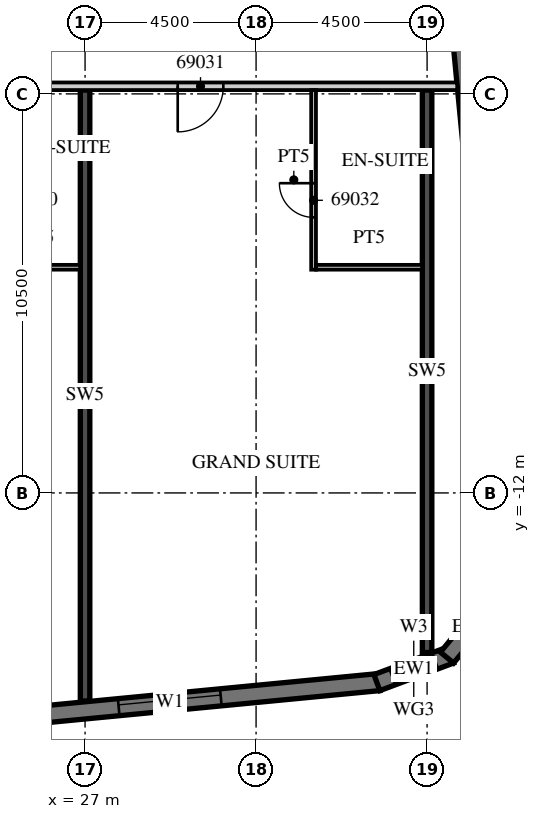
"""IFC4 building model, lengths in metres.
Left out: names, types, materials, properties, quantities, classifications, styles, units other than length and angle.
Written with IfcOpenShell. Run it as: python <this file> out.ifc"""

import sys

from ifc_helpers import new_model, si_unit, direction, frame, frame_2d, origin, place, context, subcontext, project, spatial, polyline, rectangle, outline, extrude, element, fill, save


model = new_model("IFC4")
c1 = context("Model", 3, precision=1e-05, world=origin(), true_north=direction((0.0, 1.0)))
c2 = subcontext(c1, "Body", "Model", "MODEL_VIEW")
j1 = project(units=[si_unit("LENGTHUNIT", "METRE"), si_unit("PLANEANGLEUNIT", "RADIAN")], contexts=[c1])
p1 = place(None, origin())
s1 = spatial("IfcSite", under=j1, at=p1, CompositionType="ELEMENT")
p2 = place(p1, origin())
s2 = spatial("IfcBuilding", under=s1, at=p2, CompositionType="ELEMENT")
p3 = place(p2, frame((0.0, 0.0, 278.4)))
s3 = spatial("IfcBuildingStorey", under=s2, at=p3, CompositionType="ELEMENT", Elevation=278.4)
p4 = place(p3, frame((27.0, -17.474, 0.0), z_axis=(0.0, 0.0, 1.0), x_axis=(0.0, 1.0, 0.0)))
e1 = element("IfcWall", 1, at=p4, inside=s3, PredefinedType="SHEAR", context=c2, shape_type="SweptSolid", body=[
    extrude(rectangle(XDim=16.074, YDim=0.25, at=frame_2d((8.037, 0.0))), origin(), (0.0, 0.0, 1.0), 3.3),
])
p5 = place(p3, frame((36.0, -16.199, 0.0), z_axis=(0.0, 0.0, 1.0), x_axis=(0.0, 1.0, 0.0)))
e2 = element("IfcWall", 2, at=p5, inside=s3, PredefinedType="SHEAR", context=c2, shape_type="SweptSolid", body=[
    extrude(rectangle(XDim=14.799, YDim=0.25, at=frame_2d((7.399, 0.0))), origin(), (0.0, 0.0, 1.0), 3.3),
])
p6 = place(p3, frame((-13.521, -21.624, 0.0), z_axis=(0.0, 0.0, 1.0), x_axis=(0.995396186218, 0.095845878695, 0.0)))
e3 = element("IfcWall", 3, at=p6, inside=s3, PredefinedType="SOLIDWALL", context=c2, shape_type="SweptSolid", body=[
    extrude(rectangle(XDim=48.481, YDim=0.45, at=frame_2d((24.241, 0.0))), origin(), (0.0, 0.0, 1.0), 3.02),
])
p7 = place(p6, frame((0.91, 0.0, 0.45)))
e4 = element("IfcOpeningElement", 4, at=p7, cuts=e3, PredefinedType="OPENING", context=c2, shape_type="SweptSolid", body=[
    extrude(rectangle(XDim=2.7, YDim=2.25, at=frame_2d((1.35, 1.125))), frame((0.0, 0.235, 0.0), z_axis=(0.0, -1.0, 0.0), x_axis=(1.0, 0.0, 0.0)), (0.0, 0.0, 1.0), 0.47),
])
p8 = place(p6, frame((5.431, 0.0, 0.45)))
e5 = element("IfcOpeningElement", 5, at=p8, cuts=e3, PredefinedType="OPENING", context=c2, shape_type="SweptSolid", body=[
    extrude(rectangle(XDim=2.7, YDim=2.25, at=frame_2d((1.35, 1.125))), frame((0.0, 0.235, 0.0), z_axis=(0.0, -1.0, 0.0), x_axis=(1.0, 0.0, 0.0)), (0.0, 0.0, 1.0), 0.47),
])
p9 = place(p6, frame((9.952, 0.0, 0.45)))
e6 = element("IfcOpeningElement", 6, at=p9, cuts=e3, PredefinedType="OPENING", context=c2, shape_type="SweptSolid", body=[
    extrude(rectangle(XDim=2.7, YDim=2.25, at=frame_2d((1.35, 1.125))), frame((0.0, 0.235, 0.0), z_axis=(0.0, -1.0, 0.0), x_axis=(1.0, 0.0, 0.0)), (0.0, 0.0, 1.0), 0.47),
])
p10 = place(p6, frame((14.473, 0.0, 0.45)))
e7 = element("IfcOpeningElement", 7, at=p10, cuts=e3, PredefinedType="OPENING", context=c2, shape_type="SweptSolid", body=[
    extrude(rectangle(XDim=2.7, YDim=2.25, at=frame_2d((1.35, 1.125))), frame((0.0, 0.235, 0.0), z_axis=(0.0, -1.0, 0.0), x_axis=(1.0, 0.0, 0.0)), (0.0, 0.0, 1.0), 0.47),
])
p11 = place(p6, frame((18.994, 0.0, 0.45)))
e8 = element("IfcOpeningElement", 8, at=p11, cuts=e3, PredefinedType="OPENING", context=c2, shape_type="SweptSolid", body=[
    extrude(rectangle(XDim=2.7, YDim=2.25, at=frame_2d((1.35, 1.125))), frame((0.0, 0.235, 0.0), z_axis=(0.0, -1.0, 0.0), x_axis=(1.0, 0.0, 0.0)), (0.0, 0.0, 1.0), 0.47),
])
p12 = place(p6, frame((23.514, 0.0, 0.45)))
e9 = element("IfcOpeningElement", 9, at=p12, cuts=e3, PredefinedType="OPENING", context=c2, shape_type="SweptSolid", body=[
    extrude(rectangle(XDim=2.7, YDim=2.25, at=frame_2d((1.35, 1.125))), frame((0.0, 0.235, 0.0), z_axis=(0.0, -1.0, 0.0), x_axis=(1.0, 0.0, 0.0)), (0.0, 0.0, 1.0), 0.47),
])
p13 = place(p6, frame((28.035, 0.0, 0.45)))
e10 = element("IfcOpeningElement", 10, at=p13, cuts=e3, PredefinedType="OPENING", context=c2, shape_type="SweptSolid", body=[
    extrude(rectangle(XDim=2.7, YDim=2.25, at=frame_2d((1.35, 1.125))), frame((0.0, 0.235, 0.0), z_axis=(0.0, -1.0, 0.0), x_axis=(1.0, 0.0, 0.0)), (0.0, 0.0, 1.0), 0.47),
])
p14 = place(p6, frame((32.556, 0.0, 0.45)))
e11 = element("IfcOpeningElement", 11, at=p14, cuts=e3, PredefinedType="OPENING", context=c2, shape_type="SweptSolid", body=[
    extrude(rectangle(XDim=2.7, YDim=2.25, at=frame_2d((1.35, 1.125))), frame((0.0, 0.235, 0.0), z_axis=(0.0, -1.0, 0.0), x_axis=(1.0, 0.0, 0.0)), (0.0, 0.0, 1.0), 0.47),
])
p15 = place(p6, frame((37.077, 0.0, 0.45)))
e12 = element("IfcOpeningElement", 12, at=p15, cuts=e3, PredefinedType="OPENING", context=c2, shape_type="SweptSolid", body=[
    extrude(rectangle(XDim=2.7, YDim=2.25, at=frame_2d((1.35, 1.125))), frame((0.0, 0.235, 0.0), z_axis=(0.0, -1.0, 0.0), x_axis=(1.0, 0.0, 0.0)), (0.0, 0.0, 1.0), 0.47),
])
p16 = place(p6, frame((41.598, 0.0, 0.45)))
e13 = element("IfcOpeningElement", 13, at=p16, cuts=e3, PredefinedType="OPENING", context=c2, shape_type="SweptSolid", body=[
    extrude(rectangle(XDim=2.7, YDim=2.25, at=frame_2d((1.35, 1.125))), frame((0.0, 0.235, 0.0), z_axis=(0.0, -1.0, 0.0), x_axis=(1.0, 0.0, 0.0)), (0.0, 0.0, 1.0), 0.47),
])
p17 = place(p3, frame((34.679, -16.99, 0.0), z_axis=(0.0, 0.0, 1.0), x_axis=(0.936677599948, 0.350192909346, 0.0)))
e14 = element("IfcWall", 14, at=p17, inside=s3, PredefinedType="SOLIDWALL", context=c2, shape_type="SweptSolid", body=[
    extrude(outline(polyline([(0.0, -0.225), (2.071, -0.225), (1.95, 0.225), (0.121, 0.225), (0.0, -0.225)])), origin(), (0.0, 0.0, 1.0), 3.02),
])
p18 = place(p17, frame((0.435, 0.0, 0.45)))
e15 = element("IfcOpeningElement", 15, at=p18, cuts=e14, PredefinedType="OPENING", context=c2, shape_type="SweptSolid", body=[
    extrude(rectangle(XDim=1.2, YDim=2.25, at=frame_2d((0.6, 1.125))), frame((0.0, 0.235, 0.0), z_axis=(0.0, -1.0, 0.0), x_axis=(1.0, 0.0, 0.0)), (0.0, 0.0, 1.0), 0.47),
])
p19 = place(p3, frame((36.524, -16.333, 0.0), z_axis=(0.0, 0.0, 1.0), x_axis=(0.636046112757, 0.771651049663, 0.0)))
e16 = element("IfcWall", 16, at=p19, inside=s3, PredefinedType="SOLIDWALL", context=c2, shape_type="SweptSolid", body=[
    extrude(outline(polyline([(0.0, -0.225), (2.071, -0.225), (1.95, 0.225), (0.121, 0.225), (0.0, -0.225)])), origin(), (0.0, 0.0, 1.0), 3.02),
])
p20 = place(p3, frame((38.132, -12.858, 0.0), z_axis=(0.0, 0.0, 1.0), x_axis=(-0.095847749461, 0.995396006082, 0.0)))
e17 = element("IfcWall", 17, at=p20, inside=s3, PredefinedType="SOLIDWALL", context=c2, shape_type="SweptSolid", body=[
    extrude(rectangle(XDim=32.0, YDim=0.45, at=frame_2d((16.0, 0.0))), origin(), (0.0, 0.0, 1.0), 3.02),
])
p21 = place(p3, frame((-13.5, -1.3, 0.0), z_axis=(0.0, 0.0, 1.0), x_axis=(1.0, 0.0, 0.0)))
e18 = element("IfcWall", 18, at=p21, inside=s3, PredefinedType="PARTITIONING", context=c2, shape_type="SweptSolid", body=[
    extrude(rectangle(XDim=50.293, YDim=0.2, at=frame_2d((25.146, 0.0))), origin(), (0.0, 0.0, 1.0), 3.02),
])
p22 = place(p21, frame((2.925, 0.0, 0.0)))
e19 = element("IfcOpeningElement", 19, at=p22, cuts=e18, PredefinedType="OPENING", context=c2, shape_type="SweptSolid", body=[
    extrude(rectangle(XDim=1.0, YDim=2.1, at=frame_2d((0.5, 1.05))), frame((0.0, 0.11, 0.0), z_axis=(0.0, -1.0, 0.0), x_axis=(1.0, 0.0, 0.0)), (0.0, 0.0, 1.0), 0.22),
])
p23 = place(p21, frame((6.938, 0.0, 0.0)))
e20 = element("IfcOpeningElement", 20, at=p23, cuts=e18, PredefinedType="OPENING", context=c2, shape_type="SweptSolid", body=[
    extrude(rectangle(XDim=1.2, YDim=2.1, at=frame_2d((0.6, 1.05))), frame((0.0, 0.11, 0.0), z_axis=(0.0, -1.0, 0.0), x_axis=(1.0, 0.0, 0.0)), (0.0, 0.0, 1.0), 0.22),
])
p24 = place(p21, frame((14.075, 0.0, 0.0)))
e21 = element("IfcOpeningElement", 21, at=p24, cuts=e18, PredefinedType="OPENING", context=c2, shape_type="SweptSolid", body=[
    extrude(rectangle(XDim=1.0, YDim=2.1, at=frame_2d((0.5, 1.05))), frame((0.0, 0.11, 0.0), z_axis=(0.0, -1.0, 0.0), x_axis=(1.0, 0.0, 0.0)), (0.0, 0.0, 1.0), 0.22),
])
p25 = place(p21, frame((18.55, 0.0, 0.0)))
e22 = element("IfcOpeningElement", 22, at=p25, cuts=e18, PredefinedType="OPENING", context=c2, shape_type="SweptSolid", body=[
    extrude(rectangle(XDim=1.0, YDim=2.1, at=frame_2d((0.5, 1.05))), frame((0.0, 0.11, 0.0), z_axis=(0.0, -1.0, 0.0), x_axis=(1.0, 0.0, 0.0)), (0.0, 0.0, 1.0), 0.22),
])
p26 = place(p21, frame((23.075, 0.0, 0.0)))
e23 = element("IfcOpeningElement", 23, at=p26, cuts=e18, PredefinedType="OPENING", context=c2, shape_type="SweptSolid", body=[
    extrude(rectangle(XDim=1.0, YDim=2.1, at=frame_2d((0.5, 1.05))), frame((0.0, 0.11, 0.0), z_axis=(0.0, -1.0, 0.0), x_axis=(1.0, 0.0, 0.0)), (0.0, 0.0, 1.0), 0.22),
])
p27 = place(p21, frame((29.925, 0.0, 0.0)))
e24 = element("IfcOpeningElement", 24, at=p27, cuts=e18, PredefinedType="OPENING", context=c2, shape_type="SweptSolid", body=[
    extrude(rectangle(XDim=1.0, YDim=2.1, at=frame_2d((0.5, 1.05))), frame((0.0, 0.11, 0.0), z_axis=(0.0, -1.0, 0.0), x_axis=(1.0, 0.0, 0.0)), (0.0, 0.0, 1.0), 0.22),
])
p28 = place(p21, frame((32.075, 0.0, 0.0)))
e25 = element("IfcOpeningElement", 25, at=p28, cuts=e18, PredefinedType="OPENING", context=c2, shape_type="SweptSolid", body=[
    extrude(rectangle(XDim=1.0, YDim=2.1, at=frame_2d((0.5, 1.05))), frame((0.0, 0.11, 0.0), z_axis=(0.0, -1.0, 0.0), x_axis=(1.0, 0.0, 0.0)), (0.0, 0.0, 1.0), 0.22),
])
p29 = place(p21, frame((36.55, 0.0, 0.0)))
e26 = element("IfcOpeningElement", 26, at=p29, cuts=e18, PredefinedType="OPENING", context=c2, shape_type="SweptSolid", body=[
    extrude(rectangle(XDim=1.0, YDim=2.1, at=frame_2d((0.5, 1.05))), frame((0.0, 0.11, 0.0), z_axis=(0.0, -1.0, 0.0), x_axis=(1.0, 0.0, 0.0)), (0.0, 0.0, 1.0), 0.22),
])
p30 = place(p21, frame((42.938, 0.0, 0.0)))
e27 = element("IfcOpeningElement", 27, at=p30, cuts=e18, PredefinedType="OPENING", context=c2, shape_type="SweptSolid", body=[
    extrude(rectangle(XDim=1.2, YDim=2.1, at=frame_2d((0.6, 1.05))), frame((0.0, 0.11, 0.0), z_axis=(0.0, -1.0, 0.0), x_axis=(1.0, 0.0, 0.0)), (0.0, 0.0, 1.0), 0.22),
])
p31 = place(p3, frame((24.625, -6.062, 0.0), z_axis=(0.0, 0.0, 1.0), x_axis=(1.0, 0.0, 0.0)))
e28 = element("IfcWall", 28, at=p31, inside=s3, PredefinedType="PARTITIONING", context=c2, shape_type="SweptSolid", body=[
    extrude(rectangle(XDim=2.25, YDim=0.125, at=frame_2d((1.125, 0.0))), origin(), (0.0, 0.0, 1.0), 3.02),
])
p32 = place(p3, frame((33.013, -6.125, 0.0), z_axis=(0.0, 0.0, 1.0), x_axis=(0.0, 1.0, 0.0)))
e29 = element("IfcWall", 29, at=p32, inside=s3, PredefinedType="PARTITIONING", context=c2, shape_type="SweptSolid", body=[
    extrude(rectangle(XDim=4.725, YDim=0.125, at=frame_2d((2.363, 0.0))), origin(), (0.0, 0.0, 1.0), 3.02),
])
p33 = place(p32, frame((1.375, 0.0, 0.0)))
e30 = element("IfcOpeningElement", 30, at=p33, cuts=e29, PredefinedType="OPENING", context=c2, shape_type="SweptSolid", body=[
    extrude(rectangle(XDim=0.9, YDim=2.1, at=frame_2d((0.45, 1.05))), frame((0.0, 0.073, 0.0), z_axis=(0.0, -1.0, 0.0), x_axis=(1.0, 0.0, 0.0)), (0.0, 0.0, 1.0), 0.145),
])
p34 = place(p3, frame((33.075, -6.062, 0.0), z_axis=(0.0, 0.0, 1.0), x_axis=(1.0, 0.0, 0.0)))
e31 = element("IfcWall", 31, at=p34, inside=s3, PredefinedType="PARTITIONING", context=c2, shape_type="SweptSolid", body=[
    extrude(rectangle(XDim=2.8, YDim=0.125, at=frame_2d((1.4, 0.0))), origin(), (0.0, 0.0, 1.0), 3.02),
])
p35 = place(p16, origin())
e32 = element("IfcWindow", 32, at=p35, inside=s3, PartitioningType="SINGLE_PANEL", PredefinedType="WINDOW", context=c2, shape_type="SweptSolid", body=[
    extrude(rectangle(XDim=2.7, YDim=2.25, at=frame_2d((1.35, 1.125))), frame((0.0, 0.09, 0.0), z_axis=(0.0, -1.0, 0.0), x_axis=(1.0, 0.0, 0.0)), (0.0, 0.0, 1.0), 0.06),
])
fill(e13, e32)
p36 = place(p18, origin())
e33 = element("IfcWindow", 33, at=p36, inside=s3, PartitioningType="SINGLE_PANEL", PredefinedType="WINDOW", context=c2, shape_type="SweptSolid", body=[
    extrude(rectangle(XDim=1.2, YDim=2.25, at=frame_2d((0.6, 1.125))), frame((0.0, 0.09, 0.0), z_axis=(0.0, -1.0, 0.0), x_axis=(1.0, 0.0, 0.0)), (0.0, 0.0, 1.0), 0.06),
])
fill(e15, e33)
p37 = place(p30, origin())
e34 = element("IfcDoor", 34, at=p37, inside=s3, OperationType="SINGLE_SWING_LEFT", PredefinedType="DOOR", context=c2, shape_type="SweptSolid", body=[
    extrude(rectangle(XDim=1.2, YDim=2.1, at=frame_2d((0.6, 1.05))), frame((0.0, 0.025, 0.0), z_axis=(0.0, -1.0, 0.0), x_axis=(1.0, 0.0, 0.0)), (0.0, 0.0, 1.0), 0.05),
])
fill(e27, e34)
p38 = place(p33, origin())
e35 = element("IfcDoor", 35, at=p38, inside=s3, OperationType="SINGLE_SWING_RIGHT", PredefinedType="DOOR", context=c2, shape_type="SweptSolid", body=[
    extrude(rectangle(XDim=0.9, YDim=2.1, at=frame_2d((0.45, 1.05))), frame((0.0, 0.025, 0.0), z_axis=(0.0, -1.0, 0.0), x_axis=(1.0, 0.0, 0.0)), (0.0, 0.0, 1.0), 0.05),
])
fill(e30, e35)
save(model, sys.argv[1])
